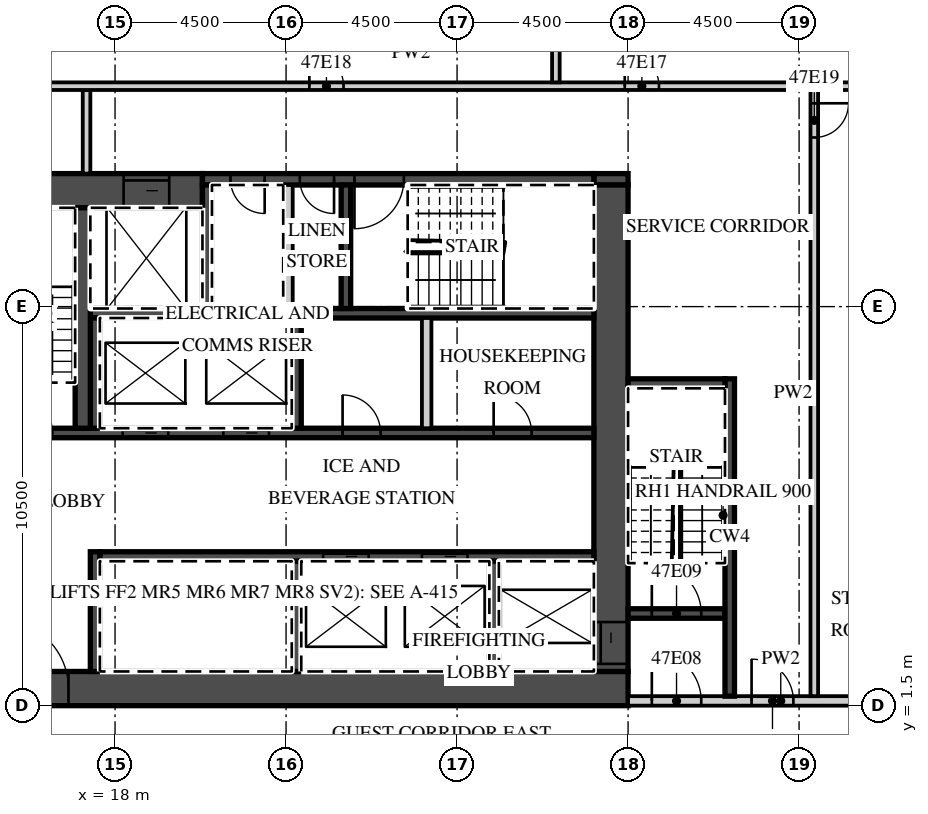
"""IFC4 building model, lengths in metres.
Left out: names, types, materials, properties, quantities, classifications, styles, units other than length and angle.
Written with IfcOpenShell. Run it as: python <this file> out.ifc"""

import sys

from ifc_helpers import new_model, si_unit, direction, frame, frame_2d, origin, place, context, subcontext, project, spatial, rectangle, extrude, element, fill, save


model = new_model("IFC4")
c1 = context("Model", 3, precision=1e-05, world=origin(), true_north=direction((0.0, 1.0)))
c2 = subcontext(c1, "Body", "Model", "MODEL_VIEW")
j1 = project(units=[si_unit("LENGTHUNIT", "METRE"), si_unit("PLANEANGLEUNIT", "RADIAN")], contexts=[c1])
p1 = place(None, origin())
s1 = spatial("IfcSite", under=j1, at=p1, CompositionType="ELEMENT")
p2 = place(p1, origin())
s2 = spatial("IfcBuilding", under=s1, at=p2, CompositionType="ELEMENT")
p3 = place(p2, frame((0.0, 0.0, 196.6)))
s3 = spatial("IfcBuildingStorey", under=s2, at=p3, CompositionType="ELEMENT", Elevation=196.6)
p4 = place(p3, frame((13.5, 1.95, 0.0), z_axis=(0.0, 0.0, 1.0), x_axis=(1.0, 0.0, 0.0)))
e1 = element("IfcWall", 1, at=p4, inside=s3, PredefinedType="SHEAR", context=c2, shape_type="SweptSolid", body=[
    extrude(rectangle(XDim=18.0, YDim=0.9, at=frame_2d((9.0, 0.0))), origin(), (0.0, 0.0, 1.0), 3.02),
])
p5 = place(p4, frame((1.475, 0.0, 0.0)))
e2 = element("IfcOpeningElement", 2, at=p5, cuts=e1, PredefinedType="OPENING", context=c2, shape_type="SweptSolid", body=[
    extrude(rectangle(XDim=1.8, YDim=2.1, at=frame_2d((0.9, 1.05))), frame((0.0, 0.46, 0.0), z_axis=(0.0, -1.0, 0.0), x_axis=(1.0, 0.0, 0.0)), (0.0, 0.0, 1.0), 0.92),
])
p6 = place(p3, frame((13.5, 15.05, 0.0), z_axis=(0.0, 0.0, 1.0), x_axis=(1.0, 0.0, 0.0)))
e3 = element("IfcWall", 3, at=p6, inside=s3, PredefinedType="SHEAR", context=c2, shape_type="SweptSolid", body=[
    extrude(rectangle(XDim=6.8, YDim=0.9, at=frame_2d((3.4, 0.0))), origin(), (0.0, 0.0, 1.0), 3.02),
])
p7 = place(p6, frame((4.725, 0.0, 0.0)))
e4 = element("IfcOpeningElement", 4, at=p7, cuts=e3, PredefinedType="OPENING", context=c2, shape_type="SweptSolid", body=[
    extrude(rectangle(XDim=1.2, YDim=2.1, at=frame_2d((0.6, 1.05))), frame((0.0, 0.46, 0.0), z_axis=(0.0, -1.0, 0.0), x_axis=(1.0, 0.0, 0.0)), (0.0, 0.0, 1.0), 0.92),
])
p8 = place(p3, frame((30.6, 15.35, 0.0), z_axis=(0.0, 0.0, 1.0), x_axis=(1.0, 0.0, 0.0)))
e5 = element("IfcWall", 5, at=p8, inside=s3, PredefinedType="SHEAR", context=c2, shape_type="SweptSolid", body=[
    extrude(rectangle(XDim=0.9, YDim=0.3, at=frame_2d((0.45, 0.0))), origin(), (0.0, 0.0, 1.0), 3.02),
])
p9 = place(p3, frame((20.3, 15.35, 0.0), z_axis=(0.0, 0.0, 1.0), x_axis=(1.0, 0.0, 0.0)))
e6 = element("IfcWall", 6, at=p9, inside=s3, PredefinedType="SHEAR", context=c2, shape_type="SweptSolid", body=[
    extrude(rectangle(XDim=10.3, YDim=0.3, at=frame_2d((5.15, 0.0))), origin(), (0.0, 0.0, 1.0), 3.02),
])
p10 = place(p9, frame((4.0, 0.0, 0.0)))
e7 = element("IfcOpeningElement", 7, at=p10, cuts=e6, PredefinedType="OPENING", context=c2, shape_type="SweptSolid", body=[
    extrude(rectangle(XDim=1.3, YDim=2.1, at=frame_2d((0.65, 1.05))), frame((0.0, 0.16, 0.0), z_axis=(0.0, -1.0, 0.0), x_axis=(1.0, 0.0, 0.0)), (0.0, 0.0, 1.0), 0.32),
])
p11 = place(p9, frame((2.562, 0.0, 0.0)))
e8 = element("IfcOpeningElement", 8, at=p11, cuts=e6, PredefinedType="OPENING", context=c2, shape_type="SweptSolid", body=[
    extrude(rectangle(XDim=0.9, YDim=2.1, at=frame_2d((0.45, 1.05))), frame((0.0, 0.16, 0.0), z_axis=(0.0, -1.0, 0.0), x_axis=(1.0, 0.0, 0.0)), (0.0, 0.0, 1.0), 0.32),
])
p12 = place(p9, frame((0.738, 0.0, 0.0)))
e9 = element("IfcOpeningElement", 9, at=p12, cuts=e6, PredefinedType="OPENING", context=c2, shape_type="SweptSolid", body=[
    extrude(rectangle(XDim=0.9, YDim=2.1, at=frame_2d((0.45, 1.05))), frame((0.0, 0.16, 0.0), z_axis=(0.0, -1.0, 0.0), x_axis=(1.0, 0.0, 0.0)), (0.0, 0.0, 1.0), 0.32),
])
p13 = place(p3, frame((31.05, 2.4, 0.0), z_axis=(0.0, 0.0, 1.0), x_axis=(0.0, 1.0, 0.0)))
e10 = element("IfcWall", 10, at=p13, inside=s3, PredefinedType="SHEAR", context=c2, shape_type="SweptSolid", body=[
    extrude(rectangle(XDim=12.8, YDim=0.9, at=frame_2d((6.4, 0.0))), origin(), (0.0, 0.0, 1.0), 3.02),
])
p14 = place(p13, frame((0.2, 0.0, 0.0)))
e11 = element("IfcOpeningElement", 11, at=p14, cuts=e10, PredefinedType="OPENING", context=c2, shape_type="SweptSolid", body=[
    extrude(rectangle(XDim=1.1, YDim=2.1, at=frame_2d((0.55, 1.05))), frame((0.0, 0.46, 0.0), z_axis=(0.0, -1.0, 0.0), x_axis=(1.0, 0.0, 0.0)), (0.0, 0.0, 1.0), 0.92),
])
p15 = place(p3, frame((17.6, 5.425, 0.0), z_axis=(0.0, 0.0, 1.0), x_axis=(1.0, 0.0, 0.0)))
e12 = element("IfcWall", 12, at=p15, inside=s3, PredefinedType="SHEAR", context=c2, shape_type="SweptSolid", body=[
    extrude(rectangle(XDim=13.0, YDim=0.25, at=frame_2d((6.5, 0.0))), origin(), (0.0, 0.0, 1.0), 3.02),
])
p16 = place(p15, frame((8.475, 0.0, 0.0)))
e13 = element("IfcOpeningElement", 13, at=p16, cuts=e12, PredefinedType="OPENING", context=c2, shape_type="SweptSolid", body=[
    extrude(rectangle(XDim=1.2, YDim=2.1, at=frame_2d((0.6, 1.05))), frame((0.0, 0.135, 0.0), z_axis=(0.0, -1.0, 0.0), x_axis=(1.0, 0.0, 0.0)), (0.0, 0.0, 1.0), 0.27),
])
p17 = place(p15, frame((5.875, 0.0, 0.0)))
e14 = element("IfcOpeningElement", 14, at=p17, cuts=e12, PredefinedType="OPENING", context=c2, shape_type="SweptSolid", body=[
    extrude(rectangle(XDim=1.2, YDim=2.1, at=frame_2d((0.6, 1.05))), frame((0.0, 0.135, 0.0), z_axis=(0.0, -1.0, 0.0), x_axis=(1.0, 0.0, 0.0)), (0.0, 0.0, 1.0), 0.27),
])
p18 = place(p3, frame((17.475, 2.4, 0.0), z_axis=(0.0, 0.0, 1.0), x_axis=(0.0, 1.0, 0.0)))
e15 = element("IfcWall", 15, at=p18, inside=s3, PredefinedType="SHEAR", context=c2, shape_type="SweptSolid", body=[
    extrude(rectangle(XDim=3.15, YDim=0.25, at=frame_2d((1.575, 0.0))), origin(), (0.0, 0.0, 1.0), 3.02),
])
for number, where, z_axis, x_axis in (
    (16, (27.975, 2.4, 0.0), (0.0, 0.0, 1.0), (0.0, 1.0, 0.0)),
    (17, (22.775, 2.4, 0.0), (0.0, 0.0, 1.0), (0.0, 1.0, 0.0)),
):
    element("IfcWall", number, at=place(p3, frame(where, z_axis=z_axis, x_axis=x_axis)), inside=s3, PredefinedType="SHEAR", context=c2, shape_type="SweptSolid", body=[
        extrude(rectangle(XDim=2.9, YDim=0.25, at=frame_2d((1.45, 0.0))), origin(), (0.0, 0.0, 1.0), 3.02),
    ])
p19 = place(p3, frame((14.4, 8.675, 0.0), z_axis=(0.0, 0.0, 1.0), x_axis=(1.0, 0.0, 0.0)))
e18 = element("IfcWall", 18, at=p19, inside=s3, PredefinedType="SHEAR", context=c2, shape_type="SweptSolid", body=[
    extrude(rectangle(XDim=16.2, YDim=0.25, at=frame_2d((8.1, 0.0))), origin(), (0.0, 0.0, 1.0), 3.02),
])
p20 = place(p19, frame((6.45, 0.0, 0.0)))
e19 = element("IfcOpeningElement", 19, at=p20, cuts=e18, PredefinedType="OPENING", context=c2, shape_type="SweptSolid", body=[
    extrude(rectangle(XDim=1.2, YDim=2.1, at=frame_2d((0.6, 1.05))), frame((0.0, 0.135, 0.0), z_axis=(0.0, -1.0, 0.0), x_axis=(1.0, 0.0, 0.0)), (0.0, 0.0, 1.0), 0.27),
])
p21 = place(p19, frame((3.8, 0.0, 0.0)))
e20 = element("IfcOpeningElement", 20, at=p21, cuts=e18, PredefinedType="OPENING", context=c2, shape_type="SweptSolid", body=[
    extrude(rectangle(XDim=1.2, YDim=2.1, at=frame_2d((0.6, 1.05))), frame((0.0, 0.135, 0.0), z_axis=(0.0, -1.0, 0.0), x_axis=(1.0, 0.0, 0.0)), (0.0, 0.0, 1.0), 0.27),
])
p22 = place(p19, frame((0.65, 0.0, 0.0)))
e21 = element("IfcOpeningElement", 21, at=p22, cuts=e18, PredefinedType="OPENING", context=c2, shape_type="SweptSolid", body=[
    extrude(rectangle(XDim=1.3, YDim=2.1, at=frame_2d((0.65, 1.05))), frame((0.0, 0.135, 0.0), z_axis=(0.0, -1.0, 0.0), x_axis=(1.0, 0.0, 0.0)), (0.0, 0.0, 1.0), 0.27),
])
p23 = place(p19, frame((13.562, 0.0, 0.0)))
e22 = element("IfcOpeningElement", 22, at=p23, cuts=e18, PredefinedType="OPENING", context=c2, shape_type="SweptSolid", body=[
    extrude(rectangle(XDim=1.0, YDim=2.1, at=frame_2d((0.5, 1.05))), frame((0.0, 0.135, 0.0), z_axis=(0.0, -1.0, 0.0), x_axis=(1.0, 0.0, 0.0)), (0.0, 0.0, 1.0), 0.27),
])
p24 = place(p19, frame((9.587, 0.0, 0.0)))
e23 = element("IfcOpeningElement", 23, at=p24, cuts=e18, PredefinedType="OPENING", context=c2, shape_type="SweptSolid", body=[
    extrude(rectangle(XDim=1.0, YDim=2.1, at=frame_2d((0.5, 1.05))), frame((0.0, 0.135, 0.0), z_axis=(0.0, -1.0, 0.0), x_axis=(1.0, 0.0, 0.0)), (0.0, 0.0, 1.0), 0.27),
])
p25 = place(p3, frame((17.35, 11.825, 0.0), z_axis=(0.0, 0.0, 1.0), x_axis=(1.0, 0.0, 0.0)))
e24 = element("IfcWall", 24, at=p25, inside=s3, PredefinedType="SHEAR", context=c2, shape_type="SweptSolid", body=[
    extrude(rectangle(XDim=13.25, YDim=0.25, at=frame_2d((6.625, 0.0))), origin(), (0.0, 0.0, 1.0), 3.02),
])
for number, where, z_axis, x_axis in (
    (25, (17.475, 8.8, 0.0), (0.0, 0.0, 1.0), (0.0, 1.0, 0.0)),
    (26, (22.775, 8.8, 0.0), (0.0, 0.0, 1.0), (0.0, 1.0, 0.0)),
):
    element("IfcWall", number, at=place(p3, frame(where, z_axis=z_axis, x_axis=x_axis)), inside=s3, PredefinedType="SHEAR", context=c2, shape_type="SweptSolid", body=[
        extrude(rectangle(XDim=2.9, YDim=0.25, at=frame_2d((1.45, 0.0))), origin(), (0.0, 0.0, 1.0), 3.02),
    ])
p26 = place(p3, frame((26.2, 8.8, 0.0), z_axis=(0.0, 0.0, 1.0), x_axis=(0.0, 1.0, 0.0)))
e27 = element("IfcWall", 27, at=p26, inside=s3, PredefinedType="PARTITIONING", context=c2, shape_type="SweptSolid", body=[
    extrude(rectangle(XDim=2.9, YDim=0.25, at=frame_2d((1.45, 0.0))), origin(), (0.0, 0.0, 1.0), 3.02),
])
p27 = place(p3, frame((17.15, 8.8, 0.0), z_axis=(0.0, 0.0, 1.0), x_axis=(0.0, 1.0, 0.0)))
e28 = element("IfcWall", 28, at=p27, inside=s3, PredefinedType="SHEAR", context=c2, shape_type="SweptSolid", body=[
    extrude(rectangle(XDim=5.8, YDim=0.4, at=frame_2d((2.9, 0.0))), origin(), (0.0, 0.0, 1.0), 3.02),
])
for number, where, z_axis, x_axis in (
    (29, (20.425, 11.95, 0.0), (0.0, 0.0, 1.0), (0.0, 1.0, 0.0)),
    (30, (24.075, 11.95, 0.0), (0.0, 0.0, 1.0), (0.0, 1.0, 0.0)),
):
    element("IfcWall", number, at=place(p3, frame(where, z_axis=z_axis, x_axis=x_axis)), inside=s3, PredefinedType="SHEAR", context=c2, shape_type="SweptSolid", body=[
        extrude(rectangle(XDim=3.25, YDim=0.25, at=frame_2d((1.625, 0.0))), origin(), (0.0, 0.0, 1.0), 3.02),
    ])
p28 = place(p3, frame((22.55, 11.95, 0.0), z_axis=(0.0, 0.0, 1.0), x_axis=(0.0, 1.0, 0.0)))
e31 = element("IfcWall", 31, at=p28, inside=s3, PredefinedType="PARTITIONING", context=c2, shape_type="SweptSolid", body=[
    extrude(rectangle(XDim=3.25, YDim=0.25, at=frame_2d((1.625, 0.0))), origin(), (0.0, 0.0, 1.0), 3.02),
])
p29 = place(p3, frame((31.5, 1.625, 0.0), z_axis=(0.0, 0.0, 1.0), x_axis=(1.0, 0.0, 0.0)))
e32 = element("IfcWall", 32, at=p29, inside=s3, PredefinedType="PARTITIONING", context=c2, shape_type="SweptSolid", body=[
    extrude(rectangle(XDim=8.035, YDim=0.25, at=frame_2d((4.018, 0.0))), origin(), (0.0, 0.0, 1.0), 3.02),
])
p30 = place(p29, frame((0.625, 0.0, 0.0)))
e33 = element("IfcOpeningElement", 33, at=p30, cuts=e32, PredefinedType="OPENING", context=c2, shape_type="SweptSolid", body=[
    extrude(rectangle(XDim=1.3, YDim=2.1, at=frame_2d((0.65, 1.05))), frame((0.0, 0.135, 0.0), z_axis=(0.0, -1.0, 0.0), x_axis=(1.0, 0.0, 0.0)), (0.0, 0.0, 1.0), 0.27),
])
p31 = place(p29, frame((3.25, 0.0, 0.0)))
e34 = element("IfcOpeningElement", 34, at=p31, cuts=e32, PredefinedType="OPENING", context=c2, shape_type="SweptSolid", body=[
    extrude(rectangle(XDim=1.1, YDim=2.1, at=frame_2d((0.55, 1.05))), frame((0.0, 0.135, 0.0), z_axis=(0.0, -1.0, 0.0), x_axis=(1.0, 0.0, 0.0)), (0.0, 0.0, 1.0), 0.27),
])
p32 = place(p3, frame((31.5, 3.925, 0.0), z_axis=(0.0, 0.0, 1.0), x_axis=(1.0, 0.0, 0.0)))
e35 = element("IfcWall", 35, at=p32, inside=s3, PredefinedType="SHEAR", context=c2, shape_type="SweptSolid", body=[
    extrude(rectangle(XDim=2.55, YDim=0.25, at=frame_2d((1.275, 0.0))), origin(), (0.0, 0.0, 1.0), 3.02),
])
p33 = place(p32, frame((0.625, 0.0, 0.0)))
e36 = element("IfcOpeningElement", 36, at=p33, cuts=e35, PredefinedType="OPENING", context=c2, shape_type="SweptSolid", body=[
    extrude(rectangle(XDim=1.3, YDim=2.1, at=frame_2d((0.65, 1.05))), frame((0.0, 0.135, 0.0), z_axis=(0.0, -1.0, 0.0), x_axis=(1.0, 0.0, 0.0)), (0.0, 0.0, 1.0), 0.27),
])
p34 = place(p3, frame((34.175, 1.75, 0.0), z_axis=(0.0, 0.0, 1.0), x_axis=(0.0, 1.0, 0.0)))
e37 = element("IfcWall", 37, at=p34, inside=s3, PredefinedType="SHEAR", context=c2, shape_type="SweptSolid", body=[
    extrude(rectangle(XDim=8.35, YDim=0.25, at=frame_2d((4.175, 0.0))), origin(), (0.0, 0.0, 1.0), 3.02),
])
p35 = place(p3, frame((31.5, 9.975, 0.0), z_axis=(0.0, 0.0, 1.0), x_axis=(1.0, 0.0, 0.0)))
e38 = element("IfcWall", 38, at=p35, inside=s3, PredefinedType="SHEAR", context=c2, shape_type="SweptSolid", body=[
    extrude(rectangle(XDim=2.55, YDim=0.25, at=frame_2d((1.275, 0.0))), origin(), (0.0, 0.0, 1.0), 3.02),
])
p36 = place(p3, frame((17.25, 15.5, 0.0), z_axis=(0.0, 0.0, 1.0), x_axis=(0.0, 1.0, 0.0)))
e39 = element("IfcWall", 39, at=p36, inside=s3, PredefinedType="PARTITIONING", context=c2, shape_type="SweptSolid", body=[
    extrude(rectangle(XDim=2.2, YDim=0.2, at=frame_2d((1.1, 0.0))), origin(), (0.0, 0.0, 1.0), 3.02),
])
p37 = place(p3, frame((36.4, 1.75, 0.0), z_axis=(0.0, 0.0, 1.0), x_axis=(0.0, 1.0, 0.0)))
e40 = element("IfcWall", 40, at=p37, inside=s3, PredefinedType="PARTITIONING", context=c2, shape_type="SweptSolid", body=[
    extrude(rectangle(XDim=15.95, YDim=0.2, at=frame_2d((7.975, 0.0))), origin(), (0.0, 0.0, 1.0), 3.02),
])
p38 = place(p37, frame((14.7, 0.0, 0.0)))
e41 = element("IfcOpeningElement", 41, at=p38, cuts=e40, PredefinedType="OPENING", context=c2, shape_type="SweptSolid", body=[
    extrude(rectangle(XDim=0.9, YDim=2.1, at=frame_2d((0.45, 1.05))), frame((0.0, 0.11, 0.0), z_axis=(0.0, -1.0, 0.0), x_axis=(1.0, 0.0, 0.0)), (0.0, 0.0, 1.0), 0.22),
])
p39 = place(p3, frame((13.6, 17.8, 0.0), z_axis=(0.0, 0.0, 1.0), x_axis=(1.0, 0.0, 0.0)))
e42 = element("IfcWall", 42, at=p39, inside=s3, PredefinedType="PARTITIONING", context=c2, shape_type="SweptSolid", body=[
    extrude(rectangle(XDim=24.378, YDim=0.2, at=frame_2d((12.189, 0.0))), origin(), (0.0, 0.0, 1.0), 3.02),
])
p40 = place(p39, frame((17.812, 0.0, 0.0)))
e43 = element("IfcOpeningElement", 43, at=p40, cuts=e42, PredefinedType="OPENING", context=c2, shape_type="SweptSolid", body=[
    extrude(rectangle(XDim=0.9, YDim=2.1, at=frame_2d((0.45, 1.05))), frame((0.0, 0.11, 0.0), z_axis=(0.0, -1.0, 0.0), x_axis=(1.0, 0.0, 0.0)), (0.0, 0.0, 1.0), 0.22),
])
p41 = place(p39, frame((9.512, 0.0, 0.0)))
e44 = element("IfcOpeningElement", 44, at=p41, cuts=e42, PredefinedType="OPENING", context=c2, shape_type="SweptSolid", body=[
    extrude(rectangle(XDim=0.9, YDim=2.1, at=frame_2d((0.45, 1.05))), frame((0.0, 0.11, 0.0), z_axis=(0.0, -1.0, 0.0), x_axis=(1.0, 0.0, 0.0)), (0.0, 0.0, 1.0), 0.22),
])
p42 = place(p3, frame((29.6, 17.9, 0.0), z_axis=(0.0, 0.0, 1.0), x_axis=(0.0, 1.0, 0.0)))
e45 = element("IfcWall", 45, at=p42, inside=s3, PredefinedType="PARTITIONING", context=c2, shape_type="SweptSolid", body=[
    extrude(rectangle(XDim=5.241, YDim=0.2, at=frame_2d((2.62, 0.0))), origin(), (0.0, 0.0, 1.0), 3.02),
])
p43 = place(p20, origin())
e46 = element("IfcDoor", 46, at=p43, inside=s3, OperationType="SLIDING_TO_LEFT", PredefinedType="DOOR", context=c2, shape_type="SweptSolid", body=[
    extrude(rectangle(XDim=1.2, YDim=2.1, at=frame_2d((0.6, 1.05))), frame((0.0, 0.025, 0.0), z_axis=(0.0, -1.0, 0.0), x_axis=(1.0, 0.0, 0.0)), (0.0, 0.0, 1.0), 0.05),
])
fill(e19, e46)
p44 = place(p21, origin())
e47 = element("IfcDoor", 47, at=p44, inside=s3, OperationType="SLIDING_TO_RIGHT", PredefinedType="DOOR", context=c2, shape_type="SweptSolid", body=[
    extrude(rectangle(XDim=1.2, YDim=2.1, at=frame_2d((0.6, 1.05))), frame((0.0, 0.025, 0.0), z_axis=(0.0, -1.0, 0.0), x_axis=(1.0, 0.0, 0.0)), (0.0, 0.0, 1.0), 0.05),
])
fill(e20, e47)
p45 = place(p16, origin())
e48 = element("IfcDoor", 48, at=p45, inside=s3, OperationType="SLIDING_TO_LEFT", PredefinedType="DOOR", context=c2, shape_type="SweptSolid", body=[
    extrude(rectangle(XDim=1.2, YDim=2.1, at=frame_2d((0.6, 1.05))), frame((0.0, 0.025, 0.0), z_axis=(0.0, -1.0, 0.0), x_axis=(1.0, 0.0, 0.0)), (0.0, 0.0, 1.0), 0.05),
])
fill(e13, e48)
p46 = place(p17, origin())
e49 = element("IfcDoor", 49, at=p46, inside=s3, OperationType="SLIDING_TO_RIGHT", PredefinedType="DOOR", context=c2, shape_type="SweptSolid", body=[
    extrude(rectangle(XDim=1.2, YDim=2.1, at=frame_2d((0.6, 1.05))), frame((0.0, 0.025, 0.0), z_axis=(0.0, -1.0, 0.0), x_axis=(1.0, 0.0, 0.0)), (0.0, 0.0, 1.0), 0.05),
])
fill(e14, e49)
p47 = place(p7, origin())
e50 = element("IfcDoor", 50, at=p47, inside=s3, OperationType="SLIDING_TO_LEFT", PredefinedType="DOOR", context=c2, shape_type="SweptSolid", body=[
    extrude(rectangle(XDim=1.2, YDim=2.1, at=frame_2d((0.6, 1.05))), frame((0.0, 0.025, 0.0), z_axis=(0.0, -1.0, 0.0), x_axis=(1.0, 0.0, 0.0)), (0.0, 0.0, 1.0), 0.05),
])
fill(e4, e50)
p48 = place(p14, origin())
e51 = element("IfcDoor", 51, at=p48, inside=s3, OperationType="SLIDING_TO_LEFT", PredefinedType="DOOR", context=c2, shape_type="SweptSolid", body=[
    extrude(rectangle(XDim=1.1, YDim=2.1, at=frame_2d((0.55, 1.05))), frame((0.0, 0.025, 0.0), z_axis=(0.0, -1.0, 0.0), x_axis=(1.0, 0.0, 0.0)), (0.0, 0.0, 1.0), 0.05),
])
fill(e11, e51)
p49 = place(p5, origin())
e52 = element("IfcDoor", 52, at=p49, inside=s3, OperationType="DOUBLE_DOOR_DOUBLE_SWING", PredefinedType="DOOR", context=c2, shape_type="SweptSolid", body=[
    extrude(rectangle(XDim=1.8, YDim=2.1, at=frame_2d((0.9, 1.05))), frame((0.0, 0.025, 0.0), z_axis=(0.0, -1.0, 0.0), x_axis=(1.0, 0.0, 0.0)), (0.0, 0.0, 1.0), 0.05),
])
fill(e2, e52)
p50 = place(p30, origin())
e53 = element("IfcDoor", 53, at=p50, inside=s3, OperationType="SINGLE_SWING_LEFT", PredefinedType="DOOR", context=c2, shape_type="SweptSolid", body=[
    extrude(rectangle(XDim=1.3, YDim=2.1, at=frame_2d((0.65, 1.05))), frame((0.0, 0.025, 0.0), z_axis=(0.0, -1.0, 0.0), x_axis=(1.0, 0.0, 0.0)), (0.0, 0.0, 1.0), 0.05),
])
fill(e33, e53)
p51 = place(p33, origin())
e54 = element("IfcDoor", 54, at=p51, inside=s3, OperationType="SINGLE_SWING_LEFT", PredefinedType="DOOR", context=c2, shape_type="SweptSolid", body=[
    extrude(rectangle(XDim=1.3, YDim=2.1, at=frame_2d((0.65, 1.05))), frame((0.0, 0.025, 0.0), z_axis=(0.0, -1.0, 0.0), x_axis=(1.0, 0.0, 0.0)), (0.0, 0.0, 1.0), 0.05),
])
fill(e36, e54)
p52 = place(p31, origin())
e55 = element("IfcDoor", 55, at=p52, inside=s3, OperationType="SINGLE_SWING_LEFT", PredefinedType="DOOR", context=c2, shape_type="SweptSolid", body=[
    extrude(rectangle(XDim=1.1, YDim=2.1, at=frame_2d((0.55, 1.05))), frame((0.0, 0.025, 0.0), z_axis=(0.0, -1.0, 0.0), x_axis=(1.0, 0.0, 0.0)), (0.0, 0.0, 1.0), 0.05),
])
fill(e34, e55)
p53 = place(p10, origin())
e56 = element("IfcDoor", 56, at=p53, inside=s3, OperationType="SINGLE_SWING_LEFT", PredefinedType="DOOR", context=c2, shape_type="SweptSolid", body=[
    extrude(rectangle(XDim=1.3, YDim=2.1, at=frame_2d((0.65, 1.05))), frame((0.0, 0.025, 0.0), z_axis=(0.0, -1.0, 0.0), x_axis=(1.0, 0.0, 0.0)), (0.0, 0.0, 1.0), 0.05),
])
fill(e7, e56)
p54 = place(p11, origin())
e57 = element("IfcDoor", 57, at=p54, inside=s3, OperationType="SINGLE_SWING_RIGHT", PredefinedType="DOOR", context=c2, shape_type="SweptSolid", body=[
    extrude(rectangle(XDim=0.9, YDim=2.1, at=frame_2d((0.45, 1.05))), frame((0.0, 0.025, 0.0), z_axis=(0.0, -1.0, 0.0), x_axis=(1.0, 0.0, 0.0)), (0.0, 0.0, 1.0), 0.05),
])
fill(e8, e57)
p55 = place(p12, origin())
e58 = element("IfcDoor", 58, at=p55, inside=s3, OperationType="SINGLE_SWING_RIGHT", PredefinedType="DOOR", context=c2, shape_type="SweptSolid", body=[
    extrude(rectangle(XDim=0.9, YDim=2.1, at=frame_2d((0.45, 1.05))), frame((0.0, 0.025, 0.0), z_axis=(0.0, -1.0, 0.0), x_axis=(1.0, 0.0, 0.0)), (0.0, 0.0, 1.0), 0.05),
])
fill(e9, e58)
p56 = place(p23, origin())
e59 = element("IfcDoor", 59, at=p56, inside=s3, OperationType="SINGLE_SWING_LEFT", PredefinedType="DOOR", context=c2, shape_type="SweptSolid", body=[
    extrude(rectangle(XDim=1.0, YDim=2.1, at=frame_2d((0.5, 1.05))), frame((0.0, 0.025, 0.0), z_axis=(0.0, -1.0, 0.0), x_axis=(1.0, 0.0, 0.0)), (0.0, 0.0, 1.0), 0.05),
])
fill(e22, e59)
p57 = place(p24, origin())
e60 = element("IfcDoor", 60, at=p57, inside=s3, OperationType="SINGLE_SWING_LEFT", PredefinedType="DOOR", context=c2, shape_type="SweptSolid", body=[
    extrude(rectangle(XDim=1.0, YDim=2.1, at=frame_2d((0.5, 1.05))), frame((0.0, 0.025, 0.0), z_axis=(0.0, -1.0, 0.0), x_axis=(1.0, 0.0, 0.0)), (0.0, 0.0, 1.0), 0.05),
])
fill(e23, e60)
p58 = place(p40, origin())
e61 = element("IfcDoor", 61, at=p58, inside=s3, OperationType="SINGLE_SWING_LEFT", PredefinedType="DOOR", context=c2, shape_type="SweptSolid", body=[
    extrude(rectangle(XDim=0.9, YDim=2.1, at=frame_2d((0.45, 1.05))), frame((0.0, 0.025, 0.0), z_axis=(0.0, -1.0, 0.0), x_axis=(1.0, 0.0, 0.0)), (0.0, 0.0, 1.0), 0.05),
])
fill(e43, e61)
p59 = place(p41, origin())
e62 = element("IfcDoor", 62, at=p59, inside=s3, OperationType="SINGLE_SWING_LEFT", PredefinedType="DOOR", context=c2, shape_type="SweptSolid", body=[
    extrude(rectangle(XDim=0.9, YDim=2.1, at=frame_2d((0.45, 1.05))), frame((0.0, 0.025, 0.0), z_axis=(0.0, -1.0, 0.0), x_axis=(1.0, 0.0, 0.0)), (0.0, 0.0, 1.0), 0.05),
])
fill(e44, e62)
p60 = place(p38, origin())
e63 = element("IfcDoor", 63, at=p60, inside=s3, OperationType="SINGLE_SWING_RIGHT", PredefinedType="DOOR", context=c2, shape_type="SweptSolid", body=[
    extrude(rectangle(XDim=0.9, YDim=2.1, at=frame_2d((0.45, 1.05))), frame((0.0, 0.025, 0.0), z_axis=(0.0, -1.0, 0.0), x_axis=(1.0, 0.0, 0.0)), (0.0, 0.0, 1.0), 0.05),
])
fill(e41, e63)
save(model, sys.argv[1])
